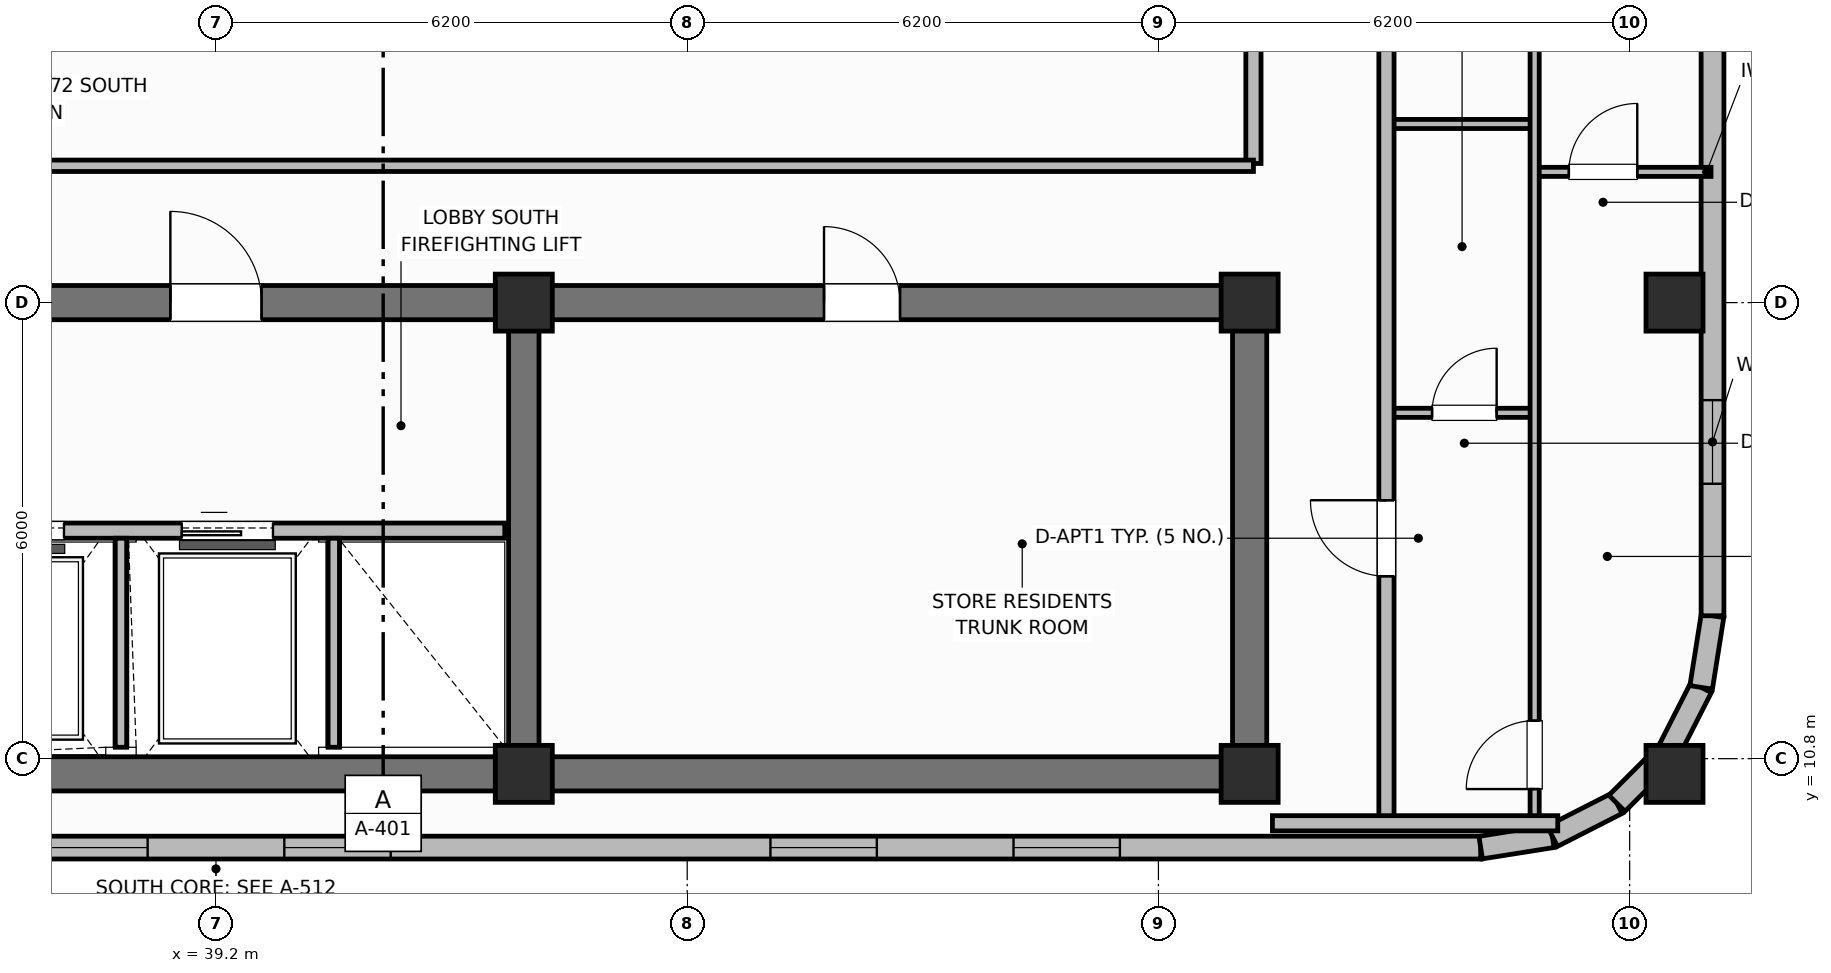
"""IFC4 building model, lengths in metres.
Left out: names, types, materials, properties, quantities, classifications, styles, units other than length and angle.
Written with IfcOpenShell. Run it as: python <this file> out.ifc"""

import sys

from ifc_helpers import new_model, si_unit, direction, frame, frame_2d, origin, origin_2d, place, context, subcontext, project, spatial, rectangle, extrude, element, fill, save


model = new_model("IFC4")
c1 = context("Model", 3, precision=1e-05, world=origin(), true_north=direction((0.0, 1.0)))
c2 = subcontext(c1, "Body", "Model", "MODEL_VIEW")
j1 = project(units=[si_unit("LENGTHUNIT", "METRE"), si_unit("PLANEANGLEUNIT", "RADIAN")], contexts=[c1])
p1 = place(None, origin())
s1 = spatial("IfcSite", under=j1, at=p1, CompositionType="ELEMENT")
p2 = place(p1, origin())
s2 = spatial("IfcBuilding", under=s1, at=p2, CompositionType="ELEMENT")
p3 = place(p2, frame((0.0, 0.0, 286.1)))
s3 = spatial("IfcBuildingStorey", under=s2, at=p3, CompositionType="ELEMENT", Elevation=286.1)
p4 = place(p3, frame((52.8, 10.6, 0.0), z_axis=(0.0, 0.0, 1.0), x_axis=(-1.0, 0.0, 0.0)))
e1 = element("IfcWall", 1, at=p4, inside=s3, PredefinedType="SHEAR", context=c2, shape_type="SweptSolid", body=[
    extrude(rectangle(XDim=27.2, YDim=0.45, at=frame_2d((13.6, 0.0))), origin(), (0.0, 0.0, 1.0), 3.7),
])
p5 = place(p3, frame((52.8, 10.825, 0.0), z_axis=(0.0, 0.0, 1.0), x_axis=(0.0, 1.0, 0.0)))
e2 = element("IfcWall", 2, at=p5, inside=s3, PredefinedType="SHEAR", context=c2, shape_type="SweptSolid", body=[
    extrude(rectangle(XDim=5.75, YDim=0.45, at=frame_2d((2.875, 0.0))), origin(), (0.0, 0.0, 1.0), 3.7),
])
p6 = place(p3, frame((25.6, 16.8, 0.0), z_axis=(0.0, 0.0, 1.0), x_axis=(1.0, 0.0, 0.0)))
e3 = element("IfcWall", 3, at=p6, inside=s3, PredefinedType="SHEAR", context=c2, shape_type="SweptSolid", body=[
    extrude(rectangle(XDim=27.2, YDim=0.45, at=frame_2d((13.6, 0.0))), origin(), (0.0, 0.0, 1.0), 3.7),
])
p7 = place(p6, frame((1.9, 0.0, 0.0)))
e4 = element("IfcOpeningElement", 4, at=p7, cuts=e3, PredefinedType="OPENING", context=c2, shape_type="SweptSolid", body=[
    extrude(rectangle(XDim=1.1, YDim=2.15, at=frame_2d((0.55, 1.075))), frame((0.0, 0.235, 0.0), z_axis=(0.0, -1.0, 0.0), x_axis=(1.0, 0.0, 0.0)), (0.0, 0.0, 1.0), 0.47),
])
p8 = place(p6, frame((13.0, 0.0, 0.0)))
e5 = element("IfcOpeningElement", 5, at=p8, cuts=e3, PredefinedType="OPENING", context=c2, shape_type="SweptSolid", body=[
    extrude(rectangle(XDim=1.2, YDim=2.15, at=frame_2d((0.6, 1.075))), frame((0.0, 0.235, 0.0), z_axis=(0.0, -1.0, 0.0), x_axis=(1.0, 0.0, 0.0)), (0.0, 0.0, 1.0), 0.47),
])
p9 = place(p6, frame((21.6, 0.0, 0.0)))
e6 = element("IfcOpeningElement", 6, at=p9, cuts=e3, PredefinedType="OPENING", context=c2, shape_type="SweptSolid", body=[
    extrude(rectangle(XDim=1.0, YDim=2.15, at=frame_2d((0.5, 1.075))), frame((0.0, 0.235, 0.0), z_axis=(0.0, -1.0, 0.0), x_axis=(1.0, 0.0, 0.0)), (0.0, 0.0, 1.0), 0.47),
])
p10 = place(p3, frame((43.25, 10.825, 0.0), z_axis=(0.0, 0.0, 1.0), x_axis=(0.0, 1.0, 0.0)))
e7 = element("IfcWall", 7, at=p10, inside=s3, PredefinedType="SHEAR", context=c2, shape_type="SweptSolid", body=[
    extrude(rectangle(XDim=5.75, YDim=0.4, at=frame_2d((2.875, 0.0))), origin(), (0.0, 0.0, 1.0), 3.7),
])
for number, where, z_axis, x_axis in (
    (8, (43.25, 10.6, 0.0), (0.0, 0.0, 1.0), (1.0, 0.0, 0.0)),
    (9, (43.25, 16.8, 0.0), (0.0, 0.0, 1.0), (1.0, 0.0, 0.0)),
    (10, (52.8, 10.6, 0.0), (0.0, 0.0, 1.0), (1.0, 0.0, 0.0)),
    (11, (52.8, 16.8, 0.0), (0.0, 0.0, 1.0), (1.0, 0.0, 0.0)),
    (12, (58.39, 10.6, 0.0), (0.0, 0.0, 1.0), (1.0, 0.0, 0.0)),
    (13, (58.39, 16.8, 0.0), (0.0, 0.0, 1.0), (1.0, 0.0, 0.0)),
):
    element("IfcColumn", number, at=place(p3, frame(where, z_axis=z_axis, x_axis=x_axis)), inside=s3, PredefinedType="COLUMN", context=c2, shape_type="SweptSolid", body=[
        extrude(rectangle(XDim=0.75, YDim=0.75, at=origin_2d()), origin(), (0.0, 0.0, 1.0), 3.7),
    ])
p11 = place(p3, frame((22.56, 9.63, 0.0), z_axis=(0.0, 0.0, 1.0), x_axis=(1.0, 0.0, 0.0)))
e14 = element("IfcWall", 14, at=p11, inside=s3, PredefinedType="SOLIDWALL", context=c2, shape_type="SweptSolid", body=[
    extrude(rectangle(XDim=33.28, YDim=0.3, at=frame_2d((16.64, 0.0))), origin(), (0.0, 0.0, 1.0), 2.73),
])
p12 = place(p11, frame((4.747, 0.0, 0.76)))
e15 = element("IfcOpeningElement", 15, at=p12, cuts=e14, PredefinedType="OPENING", context=c2, shape_type="SweptSolid", body=[
    extrude(rectangle(XDim=1.4, YDim=1.85, at=frame_2d((0.7, 0.925))), frame((0.0, 0.16, 0.0), z_axis=(0.0, -1.0, 0.0), x_axis=(1.0, 0.0, 0.0)), (0.0, 0.0, 1.0), 0.32),
])
p13 = place(p11, frame((7.945, 0.0, 0.76)))
e16 = element("IfcOpeningElement", 16, at=p13, cuts=e14, PredefinedType="OPENING", context=c2, shape_type="SweptSolid", body=[
    extrude(rectangle(XDim=1.4, YDim=1.85, at=frame_2d((0.7, 0.925))), frame((0.0, 0.16, 0.0), z_axis=(0.0, -1.0, 0.0), x_axis=(1.0, 0.0, 0.0)), (0.0, 0.0, 1.0), 0.32),
])
p14 = place(p11, frame((14.341, 0.0, 0.76)))
e17 = element("IfcOpeningElement", 17, at=p14, cuts=e14, PredefinedType="OPENING", context=c2, shape_type="SweptSolid", body=[
    extrude(rectangle(XDim=1.4, YDim=1.85, at=frame_2d((0.7, 0.925))), frame((0.0, 0.16, 0.0), z_axis=(0.0, -1.0, 0.0), x_axis=(1.0, 0.0, 0.0)), (0.0, 0.0, 1.0), 0.32),
])
p15 = place(p11, frame((17.539, 0.0, 0.76)))
e18 = element("IfcOpeningElement", 18, at=p15, cuts=e14, PredefinedType="OPENING", context=c2, shape_type="SweptSolid", body=[
    extrude(rectangle(XDim=1.4, YDim=1.85, at=frame_2d((0.7, 0.925))), frame((0.0, 0.16, 0.0), z_axis=(0.0, -1.0, 0.0), x_axis=(1.0, 0.0, 0.0)), (0.0, 0.0, 1.0), 0.32),
])
p16 = place(p11, frame((23.935, 0.0, 0.76)))
e19 = element("IfcOpeningElement", 19, at=p16, cuts=e14, PredefinedType="OPENING", context=c2, shape_type="SweptSolid", body=[
    extrude(rectangle(XDim=1.4, YDim=1.85, at=frame_2d((0.7, 0.925))), frame((0.0, 0.16, 0.0), z_axis=(0.0, -1.0, 0.0), x_axis=(1.0, 0.0, 0.0)), (0.0, 0.0, 1.0), 0.32),
])
p17 = place(p11, frame((27.133, 0.0, 0.76)))
e20 = element("IfcOpeningElement", 20, at=p17, cuts=e14, PredefinedType="OPENING", context=c2, shape_type="SweptSolid", body=[
    extrude(rectangle(XDim=1.4, YDim=1.85, at=frame_2d((0.7, 0.925))), frame((0.0, 0.16, 0.0), z_axis=(0.0, -1.0, 0.0), x_axis=(1.0, 0.0, 0.0)), (0.0, 0.0, 1.0), 0.32),
])
p18 = place(p3, frame((55.84, 9.63, 0.0), z_axis=(0.0, 0.0, 1.0), x_axis=(0.987663181641, 0.156593229835, 0.0)))
e21 = element("IfcWall", 21, at=p18, inside=s3, PredefinedType="SOLIDWALL", context=c2, shape_type="SweptSolid", body=[
    extrude(rectangle(XDim=0.954, YDim=0.3, at=frame_2d((0.477, 0.0))), origin(), (0.0, 0.0, 1.0), 2.73),
])
for number, where, z_axis, x_axis in (
    (22, (56.782, 9.779, 0.0), (0.0, 0.0, 1.0), (0.891, 0.454, 0.0)),
    (23, (57.633, 10.212, 0.0), (0.0, 0.0, 1.0), (0.707, 0.707, 0.0)),
    (24, (58.308, 10.887, 0.0), (0.0, 0.0, 1.0), (0.454, 0.891, 0.0)),
):
    element("IfcWall", number, at=place(p3, frame(where, z_axis=z_axis, x_axis=x_axis)), inside=s3, PredefinedType="SOLIDWALL", context=c2, shape_type="SweptSolid", body=[
        extrude(rectangle(XDim=0.954, YDim=0.3, at=frame_2d((0.477, 0.0))), origin(), (0.0, 0.0, 1.0), 2.73),
    ])
p19 = place(p3, frame((58.741, 11.738, 0.0), z_axis=(0.0, 0.0, 1.0), x_axis=(0.156343617883, 0.987702725088, 0.0)))
e25 = element("IfcWall", 25, at=p19, inside=s3, PredefinedType="SOLIDWALL", context=c2, shape_type="SweptSolid", body=[
    extrude(rectangle(XDim=0.954, YDim=0.3, at=frame_2d((0.477, 0.0))), origin(), (0.0, 0.0, 1.0), 2.73),
])
p20 = place(p3, frame((58.89, 12.68, 0.0), z_axis=(0.0, 0.0, 1.0), x_axis=(0.0, 1.0, 0.0)))
e26 = element("IfcWall", 26, at=p20, inside=s3, PredefinedType="SOLIDWALL", context=c2, shape_type="SweptSolid", body=[
    extrude(rectangle(XDim=11.12, YDim=0.3, at=frame_2d((5.56, 0.0))), origin(), (0.0, 0.0, 1.0), 2.73),
])
p21 = place(p20, frame((1.737, 0.0, 0.95)))
e27 = element("IfcOpeningElement", 27, at=p21, cuts=e26, PredefinedType="OPENING", context=c2, shape_type="SweptSolid", body=[
    extrude(rectangle(XDim=1.1, YDim=1.65, at=frame_2d((0.55, 0.825))), frame((0.0, 0.16, 0.0), z_axis=(0.0, -1.0, 0.0), x_axis=(1.0, 0.0, 0.0)), (0.0, 0.0, 1.0), 0.32),
])
p22 = place(p20, frame((8.283, 0.0, 0.95)))
e28 = element("IfcOpeningElement", 28, at=p22, cuts=e26, PredefinedType="OPENING", context=c2, shape_type="SweptSolid", body=[
    extrude(rectangle(XDim=1.1, YDim=1.65, at=frame_2d((0.55, 0.825))), frame((0.0, 0.16, 0.0), z_axis=(0.0, -1.0, 0.0), x_axis=(1.0, 0.0, 0.0)), (0.0, 0.0, 1.0), 0.32),
])
p23 = place(p3, frame((35.4, 13.8, 0.0), z_axis=(0.0, 0.0, 1.0), x_axis=(1.0, 0.0, 0.0)))
e29 = element("IfcWall", 29, at=p23, inside=s3, PredefinedType="PARTITIONING", context=c2, shape_type="SweptSolid", body=[
    extrude(rectangle(XDim=7.6, YDim=0.2, at=frame_2d((3.8, 0.0))), origin(), (0.0, 0.0, 1.0), 2.33),
])
p24 = place(p23, frame((0.7, 0.0, 0.0)))
e30 = element("IfcOpeningElement", 30, at=p24, cuts=e29, PredefinedType="OPENING", context=c2, shape_type="SweptSolid", body=[
    extrude(rectangle(XDim=1.1, YDim=2.15, at=frame_2d((0.55, 1.075))), frame((0.0, 0.11, 0.0), z_axis=(0.0, -1.0, 0.0), x_axis=(1.0, 0.0, 0.0)), (0.0, 0.0, 1.0), 0.22),
])
p25 = place(p23, frame((3.35, 0.0, 0.0)))
e31 = element("IfcOpeningElement", 31, at=p25, cuts=e29, PredefinedType="OPENING", context=c2, shape_type="SweptSolid", body=[
    extrude(rectangle(XDim=1.2, YDim=2.15, at=frame_2d((0.6, 1.075))), frame((0.0, 0.11, 0.0), z_axis=(0.0, -1.0, 0.0), x_axis=(1.0, 0.0, 0.0)), (0.0, 0.0, 1.0), 0.22),
])
for number, where, z_axis, x_axis in (
    (32, (37.95, 10.95, 0.0), (0.0, 0.0, 1.0), (0.0, 1.0, 0.0)),
    (33, (40.75, 10.95, 0.0), (0.0, 0.0, 1.0), (0.0, 1.0, 0.0)),
):
    element("IfcWall", number, at=place(p3, frame(where, z_axis=z_axis, x_axis=x_axis)), inside=s3, PredefinedType="PARTITIONING", context=c2, shape_type="SweptSolid", body=[
        extrude(rectangle(XDim=2.75, YDim=0.15, at=frame_2d((1.375, 0.0))), origin(), (0.0, 0.0, 1.0), 2.56),
    ])
p26 = place(p3, frame((52.85, 18.63, 0.0), z_axis=(0.0, 0.0, 1.0), x_axis=(0.0, 1.0, 0.0)))
e34 = element("IfcWall", 34, at=p26, inside=s3, PredefinedType="PARTITIONING", context=c2, shape_type="SweptSolid", body=[
    extrude(rectangle(XDim=19.14, YDim=0.2, at=frame_2d((9.57, 0.0))), origin(), (0.0, 0.0, 1.0), 2.56),
])
p27 = place(p3, frame((29.9, 18.6, 0.0), z_axis=(0.0, 0.0, 1.0), x_axis=(1.0, 0.0, 0.0)))
e35 = element("IfcWall", 35, at=p27, inside=s3, PredefinedType="PARTITIONING", context=c2, shape_type="SweptSolid", body=[
    extrude(rectangle(XDim=22.95, YDim=0.15, at=frame_2d((11.475, 0.0))), origin(), (0.0, 0.0, 1.0), 2.56),
])
p28 = place(p3, frame((54.6, 15.35, 0.0), z_axis=(0.0, 0.0, 1.0), x_axis=(1.0, 0.0, 0.0)))
e36 = element("IfcWall", 36, at=p28, inside=s3, PredefinedType="PARTITIONING", context=c2, shape_type="SweptSolid", body=[
    extrude(rectangle(XDim=1.95, YDim=0.12, at=frame_2d((0.975, 0.0))), origin(), (0.0, 0.0, 1.0), 2.56),
])
p29 = place(p28, frame((0.6, 0.0, 0.0)))
e37 = element("IfcOpeningElement", 37, at=p29, cuts=e36, PredefinedType="OPENING", context=c2, shape_type="SweptSolid", body=[
    extrude(rectangle(XDim=0.85, YDim=2.1, at=frame_2d((0.425, 1.05))), frame((0.0, 0.07, 0.0), z_axis=(0.0, -1.0, 0.0), x_axis=(1.0, 0.0, 0.0)), (0.0, 0.0, 1.0), 0.14),
])
p30 = place(p3, frame((54.6, 19.15, 0.0), z_axis=(0.0, 0.0, 1.0), x_axis=(1.0, 0.0, 0.0)))
e38 = element("IfcWall", 38, at=p30, inside=s3, PredefinedType="PARTITIONING", context=c2, shape_type="SweptSolid", body=[
    extrude(rectangle(XDim=1.95, YDim=0.12, at=frame_2d((0.975, 0.0))), origin(), (0.0, 0.0, 1.0), 2.56),
])
p31 = place(p3, frame((56.55, 18.52, 0.0), z_axis=(0.0, 0.0, 1.0), x_axis=(1.0, 0.0, 0.0)))
e39 = element("IfcWall", 39, at=p31, inside=s3, PredefinedType="PARTITIONING", context=c2, shape_type="SweptSolid", body=[
    extrude(rectangle(XDim=2.32, YDim=0.12, at=frame_2d((1.16, 0.0))), origin(), (0.0, 0.0, 1.0), 2.56),
])
p32 = place(p31, frame((0.45, 0.0, 0.0)))
e40 = element("IfcOpeningElement", 40, at=p32, cuts=e39, PredefinedType="OPENING", context=c2, shape_type="SweptSolid", body=[
    extrude(rectangle(XDim=0.9, YDim=2.1, at=frame_2d((0.45, 1.05))), frame((0.0, 0.07, 0.0), z_axis=(0.0, -1.0, 0.0), x_axis=(1.0, 0.0, 0.0)), (0.0, 0.0, 1.0), 0.14),
])
p33 = place(p3, frame((56.55, 9.99, 0.0), z_axis=(0.0, 0.0, 1.0), x_axis=(0.0, 1.0, 0.0)))
e41 = element("IfcWall", 41, at=p33, inside=s3, PredefinedType="PARTITIONING", context=c2, shape_type="SweptSolid", body=[
    extrude(rectangle(XDim=22.72, YDim=0.12, at=frame_2d((11.36, 0.0))), origin(), (0.0, 0.0, 1.0), 2.56),
])
p34 = place(p33, frame((0.41, 0.0, 0.0)))
e42 = element("IfcOpeningElement", 42, at=p34, cuts=e41, PredefinedType="OPENING", context=c2, shape_type="SweptSolid", body=[
    extrude(rectangle(XDim=0.9, YDim=2.1, at=frame_2d((0.45, 1.05))), frame((0.0, 0.07, 0.0), z_axis=(0.0, -1.0, 0.0), x_axis=(1.0, 0.0, 0.0)), (0.0, 0.0, 1.0), 0.14),
])
p35 = place(p33, frame((15.535, 0.0, 0.0)))
e43 = element("IfcOpeningElement", 43, at=p35, cuts=e41, PredefinedType="OPENING", context=c2, shape_type="SweptSolid", body=[
    extrude(rectangle(XDim=0.82, YDim=2.08, at=frame_2d((0.41, 1.04))), frame((0.0, 0.07, 0.0), z_axis=(0.0, -1.0, 0.0), x_axis=(1.0, 0.0, 0.0)), (0.0, 0.0, 1.0), 0.14),
])
p36 = place(p3, frame((54.6, 9.95, 0.0), z_axis=(0.0, 0.0, 1.0), x_axis=(0.0, 1.0, 0.0)))
e44 = element("IfcWall", 44, at=p36, inside=s3, PredefinedType="PARTITIONING", context=c2, shape_type="SweptSolid", body=[
    extrude(rectangle(XDim=36.5, YDim=0.2, at=frame_2d((18.25, 0.0))), origin(), (0.0, 0.0, 1.0), 2.56),
])
p37 = place(p36, frame((3.25, 0.0, 0.0)))
e45 = element("IfcOpeningElement", 45, at=p37, cuts=e44, PredefinedType="OPENING", context=c2, shape_type="SweptSolid", body=[
    extrude(rectangle(XDim=1.0, YDim=2.15, at=frame_2d((0.5, 1.075))), frame((0.0, 0.11, 0.0), z_axis=(0.0, -1.0, 0.0), x_axis=(1.0, 0.0, 0.0)), (0.0, 0.0, 1.0), 0.22),
])
p38 = place(p36, frame((23.5, 0.0, 0.0)))
e46 = element("IfcOpeningElement", 46, at=p38, cuts=e44, PredefinedType="OPENING", context=c2, shape_type="SweptSolid", body=[
    extrude(rectangle(XDim=1.0, YDim=2.15, at=frame_2d((0.5, 1.075))), frame((0.0, 0.11, 0.0), z_axis=(0.0, -1.0, 0.0), x_axis=(1.0, 0.0, 0.0)), (0.0, 0.0, 1.0), 0.22),
])
p39 = place(p3, frame((53.1, 9.95, 0.0), z_axis=(0.0, 0.0, 1.0), x_axis=(1.0, 0.0, 0.0)))
e47 = element("IfcWall", 47, at=p39, inside=s3, PredefinedType="PARTITIONING", context=c2, shape_type="SweptSolid", body=[
    extrude(rectangle(XDim=3.754, YDim=0.2, at=frame_2d((1.877, 0.0))), origin(), (0.0, 0.0, 1.0), 2.56),
])
p40 = place(p14, origin())
e48 = element("IfcWindow", 48, at=p40, inside=s3, PartitioningType="SINGLE_PANEL", PredefinedType="WINDOW", context=c2, shape_type="SweptSolid", body=[
    extrude(rectangle(XDim=1.4, YDim=1.85, at=frame_2d((0.7, 0.925))), frame((0.0, 0.03, 0.0), z_axis=(0.0, -1.0, 0.0), x_axis=(1.0, 0.0, 0.0)), (0.0, 0.0, 1.0), 0.06),
])
fill(e17, e48)
p41 = place(p15, origin())
e49 = element("IfcWindow", 49, at=p41, inside=s3, PartitioningType="SINGLE_PANEL", PredefinedType="WINDOW", context=c2, shape_type="SweptSolid", body=[
    extrude(rectangle(XDim=1.4, YDim=1.85, at=frame_2d((0.7, 0.925))), frame((0.0, 0.03, 0.0), z_axis=(0.0, -1.0, 0.0), x_axis=(1.0, 0.0, 0.0)), (0.0, 0.0, 1.0), 0.06),
])
fill(e18, e49)
p42 = place(p16, origin())
e50 = element("IfcWindow", 50, at=p42, inside=s3, PartitioningType="SINGLE_PANEL", PredefinedType="WINDOW", context=c2, shape_type="SweptSolid", body=[
    extrude(rectangle(XDim=1.4, YDim=1.85, at=frame_2d((0.7, 0.925))), frame((0.0, 0.03, 0.0), z_axis=(0.0, -1.0, 0.0), x_axis=(1.0, 0.0, 0.0)), (0.0, 0.0, 1.0), 0.06),
])
fill(e19, e50)
p43 = place(p17, origin())
e51 = element("IfcWindow", 51, at=p43, inside=s3, PartitioningType="SINGLE_PANEL", PredefinedType="WINDOW", context=c2, shape_type="SweptSolid", body=[
    extrude(rectangle(XDim=1.4, YDim=1.85, at=frame_2d((0.7, 0.925))), frame((0.0, 0.03, 0.0), z_axis=(0.0, -1.0, 0.0), x_axis=(1.0, 0.0, 0.0)), (0.0, 0.0, 1.0), 0.06),
])
fill(e20, e51)
p44 = place(p21, origin())
e52 = element("IfcWindow", 52, at=p44, inside=s3, PartitioningType="SINGLE_PANEL", PredefinedType="WINDOW", context=c2, shape_type="SweptSolid", body=[
    extrude(rectangle(XDim=1.1, YDim=1.65, at=frame_2d((0.55, 0.825))), frame((0.0, 0.03, 0.0), z_axis=(0.0, -1.0, 0.0), x_axis=(1.0, 0.0, 0.0)), (0.0, 0.0, 1.0), 0.06),
])
fill(e27, e52)
p45 = place(p24, origin())
e53 = element("IfcDoor", 53, at=p45, inside=s3, OperationType="SLIDING_TO_LEFT", PredefinedType="DOOR", context=c2, shape_type="SweptSolid", body=[
    extrude(rectangle(XDim=1.1, YDim=2.15, at=frame_2d((0.55, 1.075))), frame((0.0, 0.025, 0.0), z_axis=(0.0, -1.0, 0.0), x_axis=(1.0, 0.0, 0.0)), (0.0, 0.0, 1.0), 0.05),
])
fill(e30, e53)
p46 = place(p25, origin())
e54 = element("IfcDoor", 54, at=p46, inside=s3, OperationType="SLIDING_TO_LEFT", PredefinedType="DOOR", context=c2, shape_type="SweptSolid", body=[
    extrude(rectangle(XDim=1.2, YDim=2.15, at=frame_2d((0.6, 1.075))), frame((0.0, 0.025, 0.0), z_axis=(0.0, -1.0, 0.0), x_axis=(1.0, 0.0, 0.0)), (0.0, 0.0, 1.0), 0.05),
])
fill(e31, e54)
p47 = place(p29, origin())
e55 = element("IfcDoor", 55, at=p47, inside=s3, OperationType="SINGLE_SWING_RIGHT", PredefinedType="DOOR", context=c2, shape_type="SweptSolid", body=[
    extrude(rectangle(XDim=0.85, YDim=2.1, at=frame_2d((0.425, 1.05))), frame((0.0, 0.025, 0.0), z_axis=(0.0, -1.0, 0.0), x_axis=(1.0, 0.0, 0.0)), (0.0, 0.0, 1.0), 0.05),
])
fill(e37, e55)
p48 = place(p32, origin())
e56 = element("IfcDoor", 56, at=p48, inside=s3, OperationType="SINGLE_SWING_RIGHT", PredefinedType="DOOR", context=c2, shape_type="SweptSolid", body=[
    extrude(rectangle(XDim=0.9, YDim=2.1, at=frame_2d((0.45, 1.05))), frame((0.0, 0.025, 0.0), z_axis=(0.0, -1.0, 0.0), x_axis=(1.0, 0.0, 0.0)), (0.0, 0.0, 1.0), 0.05),
])
fill(e40, e56)
p49 = place(p34, origin())
e57 = element("IfcDoor", 57, at=p49, inside=s3, OperationType="SINGLE_SWING_LEFT", PredefinedType="DOOR", context=c2, shape_type="SweptSolid", body=[
    extrude(rectangle(XDim=0.9, YDim=2.1, at=frame_2d((0.45, 1.05))), frame((0.0, 0.025, 0.0), z_axis=(0.0, -1.0, 0.0), x_axis=(1.0, 0.0, 0.0)), (0.0, 0.0, 1.0), 0.05),
])
fill(e42, e57)
p50 = place(p37, origin())
e58 = element("IfcDoor", 58, at=p50, inside=s3, OperationType="SINGLE_SWING_RIGHT", PredefinedType="DOOR", context=c2, shape_type="SweptSolid", body=[
    extrude(rectangle(XDim=1.0, YDim=2.15, at=frame_2d((0.5, 1.075))), frame((0.0, 0.025, 0.0), z_axis=(0.0, -1.0, 0.0), x_axis=(1.0, 0.0, 0.0)), (0.0, 0.0, 1.0), 0.05),
])
fill(e45, e58)
p51 = place(p8, origin())
e59 = element("IfcDoor", 59, at=p51, inside=s3, OperationType="SINGLE_SWING_LEFT", PredefinedType="DOOR", context=c2, shape_type="SweptSolid", body=[
    extrude(rectangle(XDim=1.2, YDim=2.15, at=frame_2d((0.6, 1.075))), frame((0.0, 0.025, 0.0), z_axis=(0.0, -1.0, 0.0), x_axis=(1.0, 0.0, 0.0)), (0.0, 0.0, 1.0), 0.05),
])
fill(e5, e59)
p52 = place(p9, origin())
e60 = element("IfcDoor", 60, at=p52, inside=s3, OperationType="SINGLE_SWING_LEFT", PredefinedType="DOOR", context=c2, shape_type="SweptSolid", body=[
    extrude(rectangle(XDim=1.0, YDim=2.15, at=frame_2d((0.5, 1.075))), frame((0.0, 0.025, 0.0), z_axis=(0.0, -1.0, 0.0), x_axis=(1.0, 0.0, 0.0)), (0.0, 0.0, 1.0), 0.05),
])
fill(e6, e60)
save(model, sys.argv[1])
